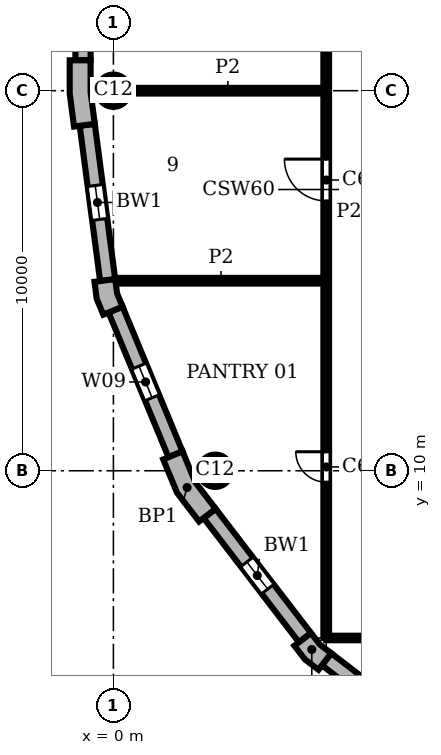
"""IFC4 building model, lengths in metres.
Left out: names, types, materials, properties, quantities, classifications, styles, units other than length and angle.
Written with IfcOpenShell. Run it as: python <this file> out.ifc"""

import sys

from ifc_helpers import new_model, si_unit, direction, frame, frame_2d, origin, origin_2d, place, context, subcontext, project, spatial, polyline, rectangle, circle, outline, extrude, element, fill, save


model = new_model("IFC4")
c1 = context("Model", 3, precision=1e-05, world=origin(), true_north=direction((0.0, 1.0)))
c2 = subcontext(c1, "Body", "Model", "MODEL_VIEW")
j1 = project(units=[si_unit("LENGTHUNIT", "METRE"), si_unit("PLANEANGLEUNIT", "RADIAN")], contexts=[c1])
p1 = place(None, origin())
s1 = spatial("IfcSite", under=j1, at=p1, CompositionType="ELEMENT")
p2 = place(p1, origin())
s2 = spatial("IfcBuilding", under=s1, at=p2, CompositionType="ELEMENT")
p3 = place(p2, frame((0.0, 0.0, 294.3)))
s3 = spatial("IfcBuildingStorey", under=s2, at=p3, CompositionType="ELEMENT", Elevation=294.3)
for number, where, z_axis, x_axis in (
    (1, (0.0, 20.0, 0.0), (0.0, 0.0, 1.0), (1.0, 0.0, 0.0)),
    (2, (2.679, 10.0, 0.0), (0.0, 0.0, 1.0), (1.0, 0.0, 0.0)),
):
    element("IfcColumn", number, at=place(p3, frame(where, z_axis=z_axis, x_axis=x_axis)), inside=s3, PredefinedType="COLUMN", context=c2, shape_type="SweptSolid", body=[
        extrude(circle(Radius=0.425, at=origin_2d()), origin(), (0.0, 0.0, 1.0), 3.9),
    ])
p4 = place(p3, origin())
e3 = element("IfcWall", 3, at=p4, inside=s3, PredefinedType="SOLIDWALL", context=c2, shape_type="SweptSolid", body=[
    extrude(outline(polyline([(-1.0, 20.8), (-1.15, 20.8), (-1.15, 19.925), (-1.036, 19.057), (-0.887, 19.076), (-0.49, 19.128), (-0.6, 19.961), (-0.6, 20.8), (-1.0, 20.8)])), origin(), (0.0, 0.0, 1.0), 3.9),
])
e4 = element("IfcWall", 4, at=p4, inside=s3, PredefinedType="SOLIDWALL", context=c2, shape_type="SweptSolid", body=[
    extrude(outline(polyline([(-0.349, 14.99), (-0.498, 14.971), (-0.439, 14.523), (-0.266, 14.106), (-0.128, 14.164), (0.242, 14.317), (0.097, 14.667), (0.047, 15.043), (-0.349, 14.99)])), origin(), (0.0, 0.0, 1.0), 3.9),
])
e5 = element("IfcWall", 5, at=p4, inside=s3, PredefinedType="SOLIDWALL", context=c2, shape_type="SweptSolid", body=[
    extrude(outline(polyline([(1.449, 10.356), (1.311, 10.299), (1.675, 9.42), (2.254, 8.665), (2.373, 8.757), (2.69, 9.0), (2.155, 9.698), (1.819, 10.51), (1.449, 10.356)])), origin(), (0.0, 0.0, 1.0), 3.9),
])
e6 = element("IfcWall", 6, at=p4, inside=s3, PredefinedType="SOLIDWALL", context=c2, shape_type="SweptSolid", body=[
    extrude(outline(polyline([(4.882, 5.487), (4.763, 5.396), (5.038, 5.038), (5.396, 4.763), (5.487, 4.882), (5.731, 5.199), (5.43, 5.43), (5.199, 5.731), (4.882, 5.487)])), origin(), (0.0, 0.0, 1.0), 3.9),
])
p5 = place(p3, frame((-0.8, 39.2, 0.0), z_axis=(0.0, 0.0, 1.0), x_axis=(0.0, -1.0, 0.0)))
e7 = element("IfcWall", 7, at=p5, inside=s3, PredefinedType="SOLIDWALL", context=c2, shape_type="SweptSolid", body=[
    extrude(rectangle(XDim=18.4, YDim=0.4, at=frame_2d((9.2, 0.0))), origin(), (0.0, 0.0, 1.0), 3.9),
])
p6 = place(p5, frame((3.75, 0.0, 0.9)))
e8 = element("IfcOpeningElement", 8, at=p6, cuts=e7, PredefinedType="OPENING", context=c2, shape_type="SweptSolid", body=[
    extrude(rectangle(XDim=0.9, YDim=2.35, at=frame_2d((0.45, 1.175))), frame((0.0, 0.21, 0.0), z_axis=(0.0, -1.0, 0.0), x_axis=(1.0, 0.0, 0.0)), (0.0, 0.0, 1.0), 0.42),
])
p7 = place(p5, frame((13.75, 0.0, 0.9)))
e9 = element("IfcOpeningElement", 9, at=p7, cuts=e7, PredefinedType="OPENING", context=c2, shape_type="SweptSolid", body=[
    extrude(rectangle(XDim=0.9, YDim=2.35, at=frame_2d((0.45, 1.175))), frame((0.0, 0.21, 0.0), z_axis=(0.0, -1.0, 0.0), x_axis=(1.0, 0.0, 0.0)), (0.0, 0.0, 1.0), 0.42),
])
p8 = place(p3, frame((-0.689, 19.102, 0.0), z_axis=(0.0, 0.0, 1.0), x_axis=(0.130514280502, -0.991446429508, 0.0)))
e10 = element("IfcWall", 10, at=p8, inside=s3, PredefinedType="SOLIDWALL", context=c2, shape_type="SweptSolid", body=[
    extrude(rectangle(XDim=4.121, YDim=0.4, at=frame_2d((2.061, 0.0))), origin(), (0.0, 0.0, 1.0), 3.9),
])
p9 = place(p8, frame((1.611, 0.0, 0.9)))
e11 = element("IfcOpeningElement", 11, at=p9, cuts=e10, PredefinedType="OPENING", context=c2, shape_type="SweptSolid", body=[
    extrude(rectangle(XDim=0.9, YDim=2.35, at=frame_2d((0.45, 1.175))), frame((0.0, 0.21, 0.0), z_axis=(0.0, -1.0, 0.0), x_axis=(1.0, 0.0, 0.0)), (0.0, 0.0, 1.0), 0.42),
])
p10 = place(p3, frame((0.057, 14.24, 0.0), z_axis=(0.0, 0.0, 1.0), x_axis=(0.382721546029, -0.923863744394, 0.0)))
e12 = element("IfcWall", 12, at=p10, inside=s3, PredefinedType="SOLIDWALL", context=c2, shape_type="SweptSolid", body=[
    extrude(rectangle(XDim=4.121, YDim=0.4, at=frame_2d((2.061, 0.0))), origin(), (0.0, 0.0, 1.0), 3.9),
])
p11 = place(p10, frame((1.611, 0.0, 0.9)))
e13 = element("IfcOpeningElement", 13, at=p11, cuts=e12, PredefinedType="OPENING", context=c2, shape_type="SweptSolid", body=[
    extrude(rectangle(XDim=0.9, YDim=2.35, at=frame_2d((0.45, 1.175))), frame((0.0, 0.21, 0.0), z_axis=(0.0, -1.0, 0.0), x_axis=(1.0, 0.0, 0.0)), (0.0, 0.0, 1.0), 0.42),
])
p12 = place(p3, frame((2.532, 8.878, 0.0), z_axis=(0.0, 0.0, 1.0), x_axis=(0.608759824817, -0.793354571229, 0.0)))
e14 = element("IfcWall", 14, at=p12, inside=s3, PredefinedType="SOLIDWALL", context=c2, shape_type="SweptSolid", body=[
    extrude(rectangle(XDim=4.121, YDim=0.4, at=frame_2d((2.061, 0.0))), origin(), (0.0, 0.0, 1.0), 3.9),
])
p13 = place(p12, frame((1.611, 0.0, 0.9)))
e15 = element("IfcOpeningElement", 15, at=p13, cuts=e14, PredefinedType="OPENING", context=c2, shape_type="SweptSolid", body=[
    extrude(rectangle(XDim=0.9, YDim=2.35, at=frame_2d((0.45, 1.175))), frame((0.0, 0.21, 0.0), z_axis=(0.0, -1.0, 0.0), x_axis=(1.0, 0.0, 0.0)), (0.0, 0.0, 1.0), 0.42),
])
p14 = place(p3, frame((5.609, 5.041, 0.0), z_axis=(0.0, 0.0, 1.0), x_axis=(0.793354571229, -0.608759824817, 0.0)))
e16 = element("IfcWall", 16, at=p14, inside=s3, PredefinedType="SOLIDWALL", context=c2, shape_type="SweptSolid", body=[
    extrude(rectangle(XDim=4.121, YDim=0.4, at=frame_2d((2.061, 0.0))), origin(), (0.0, 0.0, 1.0), 3.9),
])
p15 = place(p14, frame((1.611, 0.0, 0.9)))
e17 = element("IfcOpeningElement", 17, at=p15, cuts=e16, PredefinedType="OPENING", context=c2, shape_type="SweptSolid", body=[
    extrude(rectangle(XDim=0.9, YDim=2.35, at=frame_2d((0.45, 1.175))), frame((0.0, 0.21, 0.0), z_axis=(0.0, -1.0, 0.0), x_axis=(1.0, 0.0, 0.0)), (0.0, 0.0, 1.0), 0.42),
])
p16 = place(p3, frame((5.6, 5.6, 0.0), z_axis=(0.0, 0.0, 1.0), x_axis=(0.0, 1.0, 0.0)))
e18 = element("IfcWall", 18, at=p16, inside=s3, PredefinedType="PARTITIONING", context=c2, shape_type="SweptSolid", body=[
    extrude(rectangle(XDim=22.4, YDim=0.15, at=frame_2d((11.2, 0.0))), origin(), (0.0, 0.0, 1.0), 3.58),
])
p17 = place(p16, frame((4.1, 0.0, 0.0)))
e19 = element("IfcOpeningElement", 19, at=p17, cuts=e18, PredefinedType="OPENING", context=c2, shape_type="SweptSolid", body=[
    extrude(rectangle(XDim=0.8, YDim=2.1, at=frame_2d((0.4, 1.05))), frame((0.0, 0.085, 0.0), z_axis=(0.0, -1.0, 0.0), x_axis=(1.0, 0.0, 0.0)), (0.0, 0.0, 1.0), 0.17),
])
p18 = place(p16, frame((11.5, 0.0, 0.0)))
e20 = element("IfcOpeningElement", 20, at=p18, cuts=e18, PredefinedType="OPENING", context=c2, shape_type="SweptSolid", body=[
    extrude(rectangle(XDim=1.1, YDim=2.1, at=frame_2d((0.55, 1.05))), frame((0.0, 0.085, 0.0), z_axis=(0.0, -1.0, 0.0), x_axis=(1.0, 0.0, 0.0)), (0.0, 0.0, 1.0), 0.17),
])
p19 = place(p3, frame((0.063, 15.0, 0.0), z_axis=(0.0, 0.0, 1.0), x_axis=(1.0, 0.0, 0.0)))
e21 = element("IfcWall", 21, at=p19, inside=s3, PredefinedType="PARTITIONING", context=c2, shape_type="SweptSolid", body=[
    extrude(rectangle(XDim=5.537, YDim=0.15, at=frame_2d((2.769, 0.0))), origin(), (0.0, 0.0, 1.0), 3.58),
])
p20 = place(p3, frame((0.425, 20.0, 0.0), z_axis=(0.0, 0.0, 1.0), x_axis=(1.0, 0.0, 0.0)))
e22 = element("IfcWall", 22, at=p20, inside=s3, PredefinedType="PARTITIONING", context=c2, shape_type="SweptSolid", body=[
    extrude(rectangle(XDim=5.175, YDim=0.15, at=frame_2d((2.587, 0.0))), origin(), (0.0, 0.0, 1.0), 3.58),
])
p21 = place(p3, frame((5.6, 5.6, 0.0), z_axis=(0.0, 0.0, 1.0), x_axis=(1.0, 0.0, 0.0)))
e23 = element("IfcWall", 23, at=p21, inside=s3, PredefinedType="PARTITIONING", context=c2, shape_type="SweptSolid", body=[
    extrude(rectangle(XDim=9.4, YDim=0.12, at=frame_2d((4.7, 0.0))), origin(), (0.0, 0.0, 1.0), 3.58),
])
p22 = place(p21, frame((3.85, 0.0, 0.0)))
e24 = element("IfcOpeningElement", 24, at=p22, cuts=e23, PredefinedType="OPENING", context=c2, shape_type="SweptSolid", body=[
    extrude(rectangle(XDim=1.0, YDim=2.1, at=frame_2d((0.5, 1.05))), frame((0.0, 0.07, 0.0), z_axis=(0.0, -1.0, 0.0), x_axis=(1.0, 0.0, 0.0)), (0.0, 0.0, 1.0), 0.14),
])
p23 = place(p9, origin())
e25 = element("IfcWindow", 25, at=p23, inside=s3, PartitioningType="SINGLE_PANEL", PredefinedType="WINDOW", context=c2, shape_type="SweptSolid", body=[
    extrude(rectangle(XDim=0.9, YDim=2.35, at=frame_2d((0.45, 1.175))), frame((0.0, 0.16, 0.0), z_axis=(0.0, -1.0, 0.0), x_axis=(1.0, 0.0, 0.0)), (0.0, 0.0, 1.0), 0.06),
])
fill(e11, e25)
p24 = place(p11, origin())
e26 = element("IfcWindow", 26, at=p24, inside=s3, PartitioningType="SINGLE_PANEL", PredefinedType="WINDOW", context=c2, shape_type="SweptSolid", body=[
    extrude(rectangle(XDim=0.9, YDim=2.35, at=frame_2d((0.45, 1.175))), frame((0.0, 0.16, 0.0), z_axis=(0.0, -1.0, 0.0), x_axis=(1.0, 0.0, 0.0)), (0.0, 0.0, 1.0), 0.06),
])
fill(e13, e26)
p25 = place(p13, origin())
e27 = element("IfcWindow", 27, at=p25, inside=s3, PartitioningType="SINGLE_PANEL", PredefinedType="WINDOW", context=c2, shape_type="SweptSolid", body=[
    extrude(rectangle(XDim=0.9, YDim=2.35, at=frame_2d((0.45, 1.175))), frame((0.0, 0.16, 0.0), z_axis=(0.0, -1.0, 0.0), x_axis=(1.0, 0.0, 0.0)), (0.0, 0.0, 1.0), 0.06),
])
fill(e15, e27)
p26 = place(p17, origin())
e28 = element("IfcDoor", 28, at=p26, inside=s3, OperationType="SINGLE_SWING_RIGHT", PredefinedType="DOOR", context=c2, shape_type="SweptSolid", body=[
    extrude(rectangle(XDim=0.8, YDim=2.1, at=frame_2d((0.4, 1.05))), frame((0.0, 0.025, 0.0), z_axis=(0.0, -1.0, 0.0), x_axis=(1.0, 0.0, 0.0)), (0.0, 0.0, 1.0), 0.05),
])
fill(e19, e28)
p27 = place(p18, origin())
e29 = element("IfcDoor", 29, at=p27, inside=s3, OperationType="SINGLE_SWING_RIGHT", PredefinedType="DOOR", context=c2, shape_type="SweptSolid", body=[
    extrude(rectangle(XDim=1.1, YDim=2.1, at=frame_2d((0.55, 1.05))), frame((0.0, 0.025, 0.0), z_axis=(0.0, -1.0, 0.0), x_axis=(1.0, 0.0, 0.0)), (0.0, 0.0, 1.0), 0.05),
])
fill(e20, e29)
save(model, sys.argv[1])
